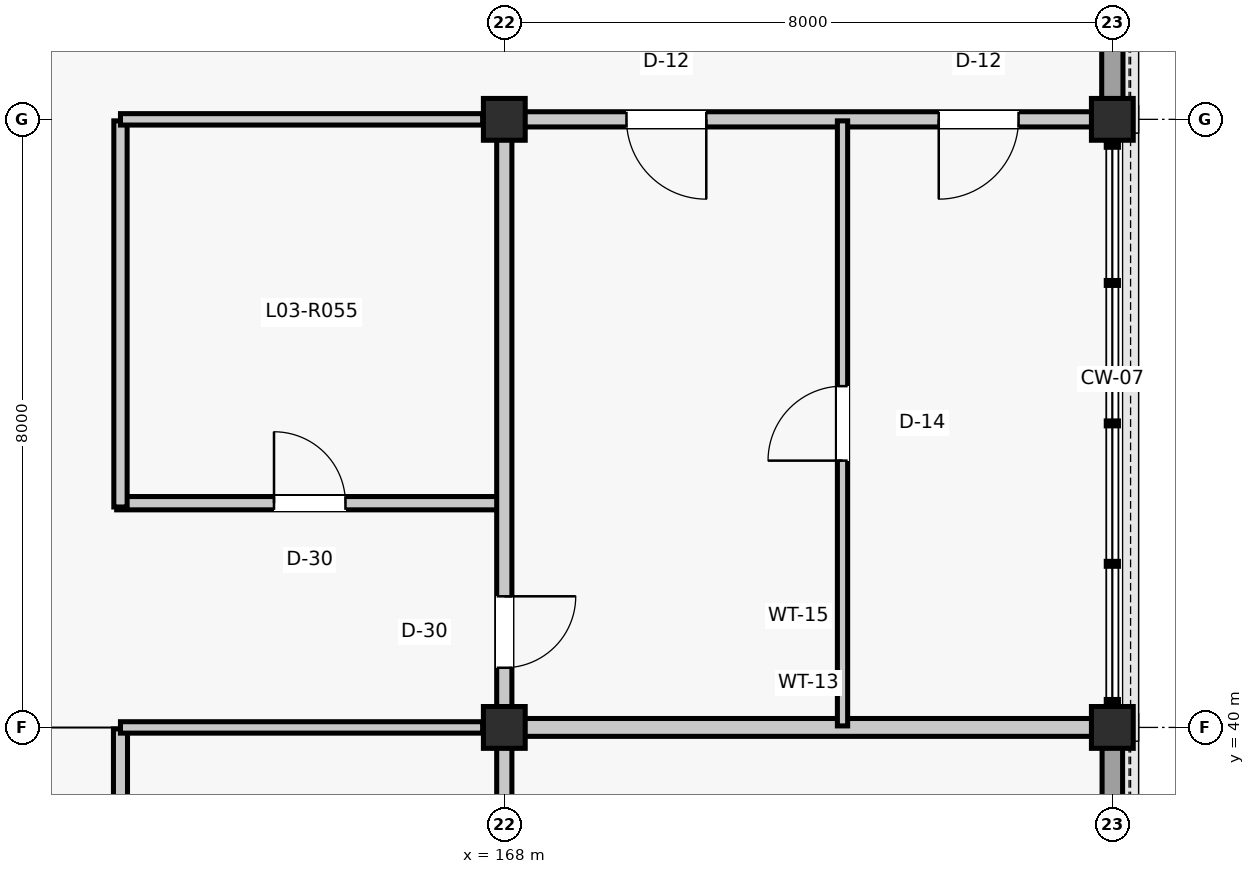
"""IFC4 building model, lengths in metres.
Left out: names, types, materials, properties, quantities, classifications, styles, units other than length and angle.
Written with IfcOpenShell. Run it as: python <this file> out.ifc"""

import sys

from ifc_helpers import new_model, si_unit, direction, frame, frame_2d, origin, origin_2d, place, context, subcontext, project, spatial, rectangle, extrude, element, fill, save


model = new_model("IFC4")
c1 = context("Model", 3, precision=1e-05, world=origin(), true_north=direction((0.0, 1.0)))
c2 = subcontext(c1, "Body", "Model", "MODEL_VIEW")
j1 = project(units=[si_unit("LENGTHUNIT", "METRE"), si_unit("PLANEANGLEUNIT", "RADIAN")], contexts=[c1])
p1 = place(None, origin())
s1 = spatial("IfcSite", under=j1, at=p1, CompositionType="ELEMENT")
p2 = place(p1, origin())
s2 = spatial("IfcBuilding", under=s1, at=p2, CompositionType="ELEMENT")
p3 = place(p2, frame((0.0, 0.0, 13.86)))
s3 = spatial("IfcBuildingStorey", under=s2, at=p3, CompositionType="ELEMENT", Elevation=13.86)
for number, where, z_axis, x_axis in (
    (1, (168.0, 40.0, 0.0), (0.0, 0.0, 1.0), (1.0, 0.0, 0.0)),
    (2, (168.0, 48.0, 0.0), (0.0, 0.0, 1.0), (1.0, 0.0, 0.0)),
    (3, (176.0, 40.0, 0.0), (0.0, 0.0, 1.0), (1.0, 0.0, 0.0)),
    (4, (176.0, 48.0, 0.0), (0.0, 0.0, 1.0), (1.0, 0.0, 0.0)),
):
    element("IfcColumn", number, at=place(p3, frame(where, z_axis=z_axis, x_axis=x_axis)), inside=s3, PredefinedType="COLUMN", context=c2, shape_type="SweptSolid", body=[
        extrude(rectangle(XDim=0.55, YDim=0.55, at=origin_2d()), origin(), (0.0, 0.0, 1.0), 3.96),
    ])
p4 = place(p3, frame((176.0, 32.26, 0.0), z_axis=(0.0, 0.0, 1.0), x_axis=(0.0, 1.0, 0.0)))
e5 = element("IfcWall", 5, at=p4, inside=s3, PredefinedType="SOLIDWALL", context=c2, shape_type="SweptSolid", body=[
    extrude(rectangle(XDim=7.48, YDim=0.27, at=frame_2d((3.74, 0.0))), origin(), (0.0, 0.0, 1.0), 3.369),
])
p5 = place(p4, frame((2.865, 0.0, 0.9)))
e6 = element("IfcOpeningElement", 6, at=p5, cuts=e5, PredefinedType="OPENING", context=c2, shape_type="SweptSolid", body=[
    extrude(rectangle(XDim=1.75, YDim=1.85, at=frame_2d((0.875, 0.925))), frame((0.0, 0.145, 0.0), z_axis=(0.0, -1.0, 0.0), x_axis=(1.0, 0.0, 0.0)), (0.0, 0.0, 1.0), 0.29),
])
p6 = place(p3, frame((176.0, 48.26, 0.0), z_axis=(0.0, 0.0, 1.0), x_axis=(0.0, 1.0, 0.0)))
e7 = element("IfcWall", 7, at=p6, inside=s3, PredefinedType="SOLIDWALL", context=c2, shape_type="SweptSolid", body=[
    extrude(rectangle(XDim=7.48, YDim=0.28, at=frame_2d((3.74, 0.0))), origin(), (0.0, 0.0, 1.0), 3.367),
])
p7 = place(p6, frame((0.771, 0.0, 0.95)))
e8 = element("IfcOpeningElement", 8, at=p7, cuts=e7, PredefinedType="OPENING", context=c2, shape_type="SweptSolid", body=[
    extrude(rectangle(XDim=1.15, YDim=1.65, at=frame_2d((0.575, 0.825))), frame((0.0, 0.15, 0.0), z_axis=(0.0, -1.0, 0.0), x_axis=(1.0, 0.0, 0.0)), (0.0, 0.0, 1.0), 0.3),
])
p8 = place(p6, frame((5.559, 0.0, 0.95)))
e9 = element("IfcOpeningElement", 9, at=p8, cuts=e7, PredefinedType="OPENING", context=c2, shape_type="SweptSolid", body=[
    extrude(rectangle(XDim=1.15, YDim=1.65, at=frame_2d((0.575, 0.825))), frame((0.0, 0.15, 0.0), z_axis=(0.0, -1.0, 0.0), x_axis=(1.0, 0.0, 0.0)), (0.0, 0.0, 1.0), 0.3),
])
p9 = place(p3, frame((162.95, 34.9, 0.0), z_axis=(0.0, 0.0, 1.0), x_axis=(0.0, 1.0, 0.0)))
e10 = element("IfcWall", 10, at=p9, inside=s3, PredefinedType="PARTITIONING", context=c2, shape_type="SweptSolid", body=[
    extrude(rectangle(XDim=5.08, YDim=0.185, at=frame_2d((2.54, 0.0))), origin(), (0.0, 0.0, 1.0), 3.258),
])
p10 = place(p3, frame((162.95, 40.0, 0.0), z_axis=(0.0, 0.0, 1.0), x_axis=(1.0, 0.0, 0.0)))
e11 = element("IfcWall", 11, at=p10, inside=s3, PredefinedType="PARTITIONING", context=c2, shape_type="SweptSolid", body=[
    extrude(rectangle(XDim=4.765, YDim=0.15, at=frame_2d((2.383, 0.0))), origin(), (0.0, 0.0, 1.0), 3.258),
])
p11 = place(p3, frame((162.9, 42.95, 0.0), z_axis=(0.0, 0.0, 1.0), x_axis=(1.0, 0.0, 0.0)))
e12 = element("IfcWall", 12, at=p11, inside=s3, PredefinedType="PARTITIONING", context=c2, shape_type="SweptSolid", body=[
    extrude(rectangle(XDim=5.08, YDim=0.175, at=frame_2d((2.54, 0.0))), origin(), (0.0, 0.0, 1.0), 3.452),
])
p12 = place(p11, frame((2.07, 0.0, 0.0)))
e13 = element("IfcOpeningElement", 13, at=p12, cuts=e12, PredefinedType="OPENING", context=c2, shape_type="SweptSolid", body=[
    extrude(rectangle(XDim=0.94, YDim=2.12, at=frame_2d((0.47, 1.06))), frame((0.0, 0.097, 0.0), z_axis=(0.0, -1.0, 0.0), x_axis=(1.0, 0.0, 0.0)), (0.0, 0.0, 1.0), 0.195),
])
p13 = place(p3, frame((162.95, 42.9, 0.0), z_axis=(0.0, 0.0, 1.0), x_axis=(0.0, 1.0, 0.0)))
e14 = element("IfcWall", 14, at=p13, inside=s3, PredefinedType="PARTITIONING", context=c2, shape_type="SweptSolid", body=[
    extrude(rectangle(XDim=5.08, YDim=0.175, at=frame_2d((2.54, 0.0))), origin(), (0.0, 0.0, 1.0), 3.241),
])
p14 = place(p3, frame((162.95, 48.0, 0.0), z_axis=(0.0, 0.0, 1.0), x_axis=(1.0, 0.0, 0.0)))
e15 = element("IfcWall", 15, at=p14, inside=s3, PredefinedType="PARTITIONING", context=c2, shape_type="SweptSolid", body=[
    extrude(rectangle(XDim=4.765, YDim=0.15, at=frame_2d((2.383, 0.0))), origin(), (0.0, 0.0, 1.0), 3.241),
])
p15 = place(p3, frame((168.0, 32.265, 0.0), z_axis=(0.0, 0.0, 1.0), x_axis=(0.0, 1.0, 0.0)))
e16 = element("IfcWall", 16, at=p15, inside=s3, PredefinedType="PARTITIONING", context=c2, shape_type="SweptSolid", body=[
    extrude(rectangle(XDim=7.47, YDim=0.2, at=frame_2d((3.735, 0.0))), origin(), (0.0, 0.0, 1.0), 3.258),
])
p16 = place(p15, frame((0.52, 0.0, 0.0)))
e17 = element("IfcOpeningElement", 17, at=p16, cuts=e16, PredefinedType="OPENING", context=c2, shape_type="SweptSolid", body=[
    extrude(rectangle(XDim=0.94, YDim=2.12, at=frame_2d((0.47, 1.06))), frame((0.0, 0.11, 0.0), z_axis=(0.0, -1.0, 0.0), x_axis=(1.0, 0.0, 0.0)), (0.0, 0.0, 1.0), 0.22),
])
p17 = place(p3, frame((168.0, 40.265, 0.0), z_axis=(0.0, 0.0, 1.0), x_axis=(0.0, 1.0, 0.0)))
e18 = element("IfcWall", 18, at=p17, inside=s3, PredefinedType="PARTITIONING", context=c2, shape_type="SweptSolid", body=[
    extrude(rectangle(XDim=7.47, YDim=0.2, at=frame_2d((3.735, 0.0))), origin(), (0.0, 0.0, 1.0), 3.452),
])
p18 = place(p17, frame((0.52, 0.0, 0.0)))
e19 = element("IfcOpeningElement", 19, at=p18, cuts=e18, PredefinedType="OPENING", context=c2, shape_type="SweptSolid", body=[
    extrude(rectangle(XDim=0.94, YDim=2.12, at=frame_2d((0.47, 1.06))), frame((0.0, 0.11, 0.0), z_axis=(0.0, -1.0, 0.0), x_axis=(1.0, 0.0, 0.0)), (0.0, 0.0, 1.0), 0.22),
])
p19 = place(p3, frame((168.265, 40.0, 0.0), z_axis=(0.0, 0.0, 1.0), x_axis=(1.0, 0.0, 0.0)))
e20 = element("IfcWall", 20, at=p19, inside=s3, PredefinedType="PARTITIONING", context=c2, shape_type="SweptSolid", body=[
    extrude(rectangle(XDim=7.47, YDim=0.235, at=frame_2d((3.735, 0.0))), origin(), (0.0, 0.0, 1.0), 3.241),
])
p20 = place(p3, frame((168.265, 48.0, 0.0), z_axis=(0.0, 0.0, 1.0), x_axis=(1.0, 0.0, 0.0)))
e21 = element("IfcWall", 21, at=p20, inside=s3, PredefinedType="PARTITIONING", context=c2, shape_type="SweptSolid", body=[
    extrude(rectangle(XDim=7.47, YDim=0.2, at=frame_2d((3.735, 0.0))), origin(), (0.0, 0.0, 1.0), 3.452),
])
p21 = place(p20, frame((1.343, 0.0, 0.0)))
e22 = element("IfcOpeningElement", 22, at=p21, cuts=e21, PredefinedType="OPENING", context=c2, shape_type="SweptSolid", body=[
    extrude(rectangle(XDim=1.05, YDim=2.15, at=frame_2d((0.525, 1.075))), frame((0.0, 0.11, 0.0), z_axis=(0.0, -1.0, 0.0), x_axis=(1.0, 0.0, 0.0)), (0.0, 0.0, 1.0), 0.22),
])
p22 = place(p20, frame((5.451, 0.0, 0.0)))
e23 = element("IfcOpeningElement", 23, at=p22, cuts=e21, PredefinedType="OPENING", context=c2, shape_type="SweptSolid", body=[
    extrude(rectangle(XDim=1.05, YDim=2.15, at=frame_2d((0.525, 1.075))), frame((0.0, 0.11, 0.0), z_axis=(0.0, -1.0, 0.0), x_axis=(1.0, 0.0, 0.0)), (0.0, 0.0, 1.0), 0.22),
])
p23 = place(p3, frame((172.45, 40.02, 0.0), z_axis=(0.0, 0.0, 1.0), x_axis=(0.0, 1.0, 0.0)))
e24 = element("IfcWall", 24, at=p23, inside=s3, PredefinedType="PARTITIONING", context=c2, shape_type="SweptSolid", body=[
    extrude(rectangle(XDim=7.96, YDim=0.135, at=frame_2d((3.98, 0.0))), origin(), (0.0, 0.0, 1.0), 3.241),
])
p24 = place(p23, frame((3.49, 0.0, 0.0)))
e25 = element("IfcOpeningElement", 25, at=p24, cuts=e24, PredefinedType="OPENING", context=c2, shape_type="SweptSolid", body=[
    extrude(rectangle(XDim=0.98, YDim=2.15, at=frame_2d((0.49, 1.075))), frame((0.0, 0.077, 0.0), z_axis=(0.0, -1.0, 0.0), x_axis=(1.0, 0.0, 0.0)), (0.0, 0.0, 1.0), 0.155),
])
p25 = place(p12, origin())
e26 = element("IfcDoor", 26, at=p25, inside=s3, OperationType="SINGLE_SWING_LEFT", PredefinedType="DOOR", context=c2, shape_type="SweptSolid", body=[
    extrude(rectangle(XDim=0.94, YDim=2.12, at=frame_2d((0.47, 1.06))), frame((0.0, 0.025, 0.0), z_axis=(0.0, -1.0, 0.0), x_axis=(1.0, 0.0, 0.0)), (0.0, 0.0, 1.0), 0.05),
])
fill(e13, e26)
p26 = place(p18, frame((0.94, 0.0, 0.0), z_axis=(0.0, 0.0, 1.0), x_axis=(-1.0, 0.0, 0.0)))
e27 = element("IfcDoor", 27, at=p26, inside=s3, OperationType="SINGLE_SWING_RIGHT", PredefinedType="DOOR", context=c2, shape_type="SweptSolid", body=[
    extrude(rectangle(XDim=0.94, YDim=2.12, at=frame_2d((0.47, 1.06))), frame((0.0, 0.025, 0.0), z_axis=(0.0, -1.0, 0.0), x_axis=(1.0, 0.0, 0.0)), (0.0, 0.0, 1.0), 0.05),
])
fill(e19, e27)
p27 = place(p21, frame((1.05, 0.0, 0.0), z_axis=(0.0, 0.0, 1.0), x_axis=(-1.0, 0.0, 0.0)))
e28 = element("IfcDoor", 28, at=p27, inside=s3, OperationType="SINGLE_SWING_RIGHT", PredefinedType="DOOR", context=c2, shape_type="SweptSolid", body=[
    extrude(rectangle(XDim=1.05, YDim=2.15, at=frame_2d((0.525, 1.075))), frame((0.0, 0.025, 0.0), z_axis=(0.0, -1.0, 0.0), x_axis=(1.0, 0.0, 0.0)), (0.0, 0.0, 1.0), 0.05),
])
fill(e22, e28)
p28 = place(p22, frame((1.05, 0.0, 0.0), z_axis=(0.0, 0.0, 1.0), x_axis=(-1.0, 0.0, 0.0)))
e29 = element("IfcDoor", 29, at=p28, inside=s3, OperationType="SINGLE_SWING_LEFT", PredefinedType="DOOR", context=c2, shape_type="SweptSolid", body=[
    extrude(rectangle(XDim=1.05, YDim=2.15, at=frame_2d((0.525, 1.075))), frame((0.0, 0.025, 0.0), z_axis=(0.0, -1.0, 0.0), x_axis=(1.0, 0.0, 0.0)), (0.0, 0.0, 1.0), 0.05),
])
fill(e23, e29)
p29 = place(p24, origin())
e30 = element("IfcDoor", 30, at=p29, inside=s3, OperationType="SINGLE_SWING_LEFT", PredefinedType="DOOR", context=c2, shape_type="SweptSolid", body=[
    extrude(rectangle(XDim=0.98, YDim=2.15, at=frame_2d((0.49, 1.075))), frame((0.0, 0.025, 0.0), z_axis=(0.0, -1.0, 0.0), x_axis=(1.0, 0.0, 0.0)), (0.0, 0.0, 1.0), 0.05),
])
fill(e25, e30)
save(model, sys.argv[1])
